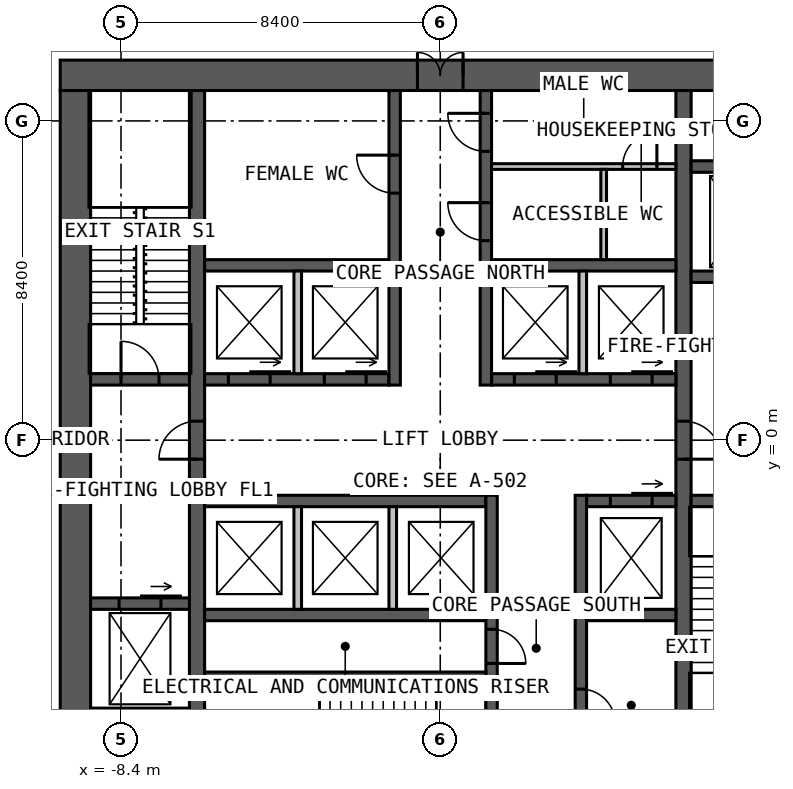
"""IFC4 building model, lengths in metres.
Left out: names, types, materials, properties, quantities, classifications, styles, units other than length and angle.
Written with IfcOpenShell. Run it as: python <this file> out.ifc"""

import sys

from ifc_helpers import new_model, si_unit, direction, frame, frame_2d, origin, place, context, subcontext, project, spatial, rectangle, extrude, element, fill, save


model = new_model("IFC4")
c1 = context("Model", 3, precision=1e-05, world=origin(), true_north=direction((0.0, 1.0)))
c2 = subcontext(c1, "Body", "Model", "MODEL_VIEW")
j1 = project(units=[si_unit("LENGTHUNIT", "METRE"), si_unit("PLANEANGLEUNIT", "RADIAN")], contexts=[c1])
p1 = place(None, origin())
s1 = spatial("IfcSite", under=j1, at=p1, CompositionType="ELEMENT")
p2 = place(p1, origin())
s2 = spatial("IfcBuilding", under=s1, at=p2, CompositionType="ELEMENT")
p3 = place(p2, frame((0.0, 0.0, 77.0)))
s3 = spatial("IfcBuildingStorey", under=s2, at=p3, CompositionType="ELEMENT", Elevation=77.0)
p4 = place(p3, frame((-10.0, 9.6, 0.0), z_axis=(0.0, 0.0, 1.0), x_axis=(1.0, 0.0, 0.0)))
e1 = element("IfcWall", 1, at=p4, inside=s3, PredefinedType="SOLIDWALL", context=c2, shape_type="SweptSolid", body=[
    extrude(rectangle(XDim=20.0, YDim=0.8, at=frame_2d((10.0, 0.0))), origin(), (0.0, 0.0, 1.0), 4.0),
])
p5 = place(p4, frame((9.4, 0.0, 0.0)))
e2 = element("IfcOpeningElement", 2, at=p5, cuts=e1, PredefinedType="OPENING", context=c2, shape_type="SweptSolid", body=[
    extrude(rectangle(XDim=1.2, YDim=2.2, at=frame_2d((0.6, 1.1))), frame((0.0, 0.41, 0.0), z_axis=(0.0, -1.0, 0.0), x_axis=(1.0, 0.0, 0.0)), (0.0, 0.0, 1.0), 0.82),
])
p6 = place(p3, frame((-9.6, 9.2, 0.0), z_axis=(0.0, 0.0, 1.0), x_axis=(0.0, -1.0, 0.0)))
e3 = element("IfcWall", 3, at=p6, inside=s3, PredefinedType="SOLIDWALL", context=c2, shape_type="SweptSolid", body=[
    extrude(rectangle(XDim=18.4, YDim=0.8, at=frame_2d((9.2, 0.0))), origin(), (0.0, 0.0, 1.0), 4.0),
])
p7 = place(p3, frame((-6.4, -9.2, 0.0), z_axis=(0.0, 0.0, 1.0), x_axis=(0.0, 1.0, 0.0)))
e4 = element("IfcWall", 4, at=p7, inside=s3, PredefinedType="SOLIDWALL", context=c2, shape_type="SweptSolid", body=[
    extrude(rectangle(XDim=18.4, YDim=0.4, at=frame_2d((9.2, 0.0))), origin(), (0.0, 0.0, 1.0), 4.0),
])
p8 = place(p7, frame((8.7, 0.0, 0.0)))
e5 = element("IfcOpeningElement", 5, at=p8, cuts=e4, PredefinedType="OPENING", context=c2, shape_type="SweptSolid", body=[
    extrude(rectangle(XDim=1.0, YDim=2.2, at=frame_2d((0.5, 1.1))), frame((0.0, 0.21, 0.0), z_axis=(0.0, -1.0, 0.0), x_axis=(1.0, 0.0, 0.0)), (0.0, 0.0, 1.0), 0.42),
])
p9 = place(p3, frame((6.4, 9.2, 0.0), z_axis=(0.0, 0.0, 1.0), x_axis=(0.0, -1.0, 0.0)))
e6 = element("IfcWall", 6, at=p9, inside=s3, PredefinedType="SOLIDWALL", context=c2, shape_type="SweptSolid", body=[
    extrude(rectangle(XDim=18.4, YDim=0.4, at=frame_2d((9.2, 0.0))), origin(), (0.0, 0.0, 1.0), 4.0),
])
p10 = place(p9, frame((8.7, 0.0, 0.0)))
e7 = element("IfcOpeningElement", 7, at=p10, cuts=e6, PredefinedType="OPENING", context=c2, shape_type="SweptSolid", body=[
    extrude(rectangle(XDim=1.0, YDim=2.2, at=frame_2d((0.5, 1.1))), frame((0.0, 0.21, 0.0), z_axis=(0.0, -1.0, 0.0), x_axis=(1.0, 0.0, 0.0)), (0.0, 0.0, 1.0), 0.42),
])
p11 = place(p3, frame((-6.2, 1.6, 0.0), z_axis=(0.0, 0.0, 1.0), x_axis=(1.0, 0.0, 0.0)))
e8 = element("IfcWall", 8, at=p11, inside=s3, PredefinedType="SOLIDWALL", context=c2, shape_type="SweptSolid", body=[
    extrude(rectangle(XDim=4.85, YDim=0.3, at=frame_2d((2.425, 0.0))), origin(), (0.0, 0.0, 1.0), 4.0),
])
p12 = place(p11, frame((0.625, 0.0, 0.0)))
e9 = element("IfcOpeningElement", 9, at=p12, cuts=e8, PredefinedType="OPENING", context=c2, shape_type="SweptSolid", body=[
    extrude(rectangle(XDim=1.1, YDim=2.2, at=frame_2d((0.55, 1.1))), frame((0.0, 0.16, 0.0), z_axis=(0.0, -1.0, 0.0), x_axis=(1.0, 0.0, 0.0)), (0.0, 0.0, 1.0), 0.32),
])
p13 = place(p11, frame((3.15, 0.0, 0.0)))
e10 = element("IfcOpeningElement", 10, at=p13, cuts=e8, PredefinedType="OPENING", context=c2, shape_type="SweptSolid", body=[
    extrude(rectangle(XDim=1.1, YDim=2.2, at=frame_2d((0.55, 1.1))), frame((0.0, 0.16, 0.0), z_axis=(0.0, -1.0, 0.0), x_axis=(1.0, 0.0, 0.0)), (0.0, 0.0, 1.0), 0.32),
])
p14 = place(p3, frame((1.35, 1.6, 0.0), z_axis=(0.0, 0.0, 1.0), x_axis=(1.0, 0.0, 0.0)))
e11 = element("IfcWall", 11, at=p14, inside=s3, PredefinedType="SOLIDWALL", context=c2, shape_type="SweptSolid", body=[
    extrude(rectangle(XDim=4.85, YDim=0.3, at=frame_2d((2.425, 0.0))), origin(), (0.0, 0.0, 1.0), 4.0),
])
p15 = place(p14, frame((0.6, 0.0, 0.0)))
e12 = element("IfcOpeningElement", 12, at=p15, cuts=e11, PredefinedType="OPENING", context=c2, shape_type="SweptSolid", body=[
    extrude(rectangle(XDim=1.1, YDim=2.2, at=frame_2d((0.55, 1.1))), frame((0.0, 0.16, 0.0), z_axis=(0.0, -1.0, 0.0), x_axis=(1.0, 0.0, 0.0)), (0.0, 0.0, 1.0), 0.32),
])
p16 = place(p14, frame((3.125, 0.0, 0.0)))
e13 = element("IfcOpeningElement", 13, at=p16, cuts=e11, PredefinedType="OPENING", context=c2, shape_type="SweptSolid", body=[
    extrude(rectangle(XDim=1.1, YDim=2.2, at=frame_2d((0.55, 1.1))), frame((0.0, 0.16, 0.0), z_axis=(0.0, -1.0, 0.0), x_axis=(1.0, 0.0, 0.0)), (0.0, 0.0, 1.0), 0.32),
])
for number, where, z_axis, x_axis in (
    (14, (-6.2, 4.6, 0.0), (0.0, 0.0, 1.0), (1.0, 0.0, 0.0)),
    (15, (1.35, 4.6, 0.0), (0.0, 0.0, 1.0), (1.0, 0.0, 0.0)),
):
    element("IfcWall", number, at=place(p3, frame(where, z_axis=z_axis, x_axis=x_axis)), inside=s3, PredefinedType="SOLIDWALL", context=c2, shape_type="SweptSolid", body=[
        extrude(rectangle(XDim=4.85, YDim=0.3, at=frame_2d((2.425, 0.0))), origin(), (0.0, 0.0, 1.0), 4.0),
    ])
p17 = place(p3, frame((-1.2, 1.45, 0.0), z_axis=(0.0, 0.0, 1.0), x_axis=(0.0, 1.0, 0.0)))
e16 = element("IfcWall", 16, at=p17, inside=s3, PredefinedType="SOLIDWALL", context=c2, shape_type="SweptSolid", body=[
    extrude(rectangle(XDim=7.75, YDim=0.3, at=frame_2d((3.875, 0.0))), origin(), (0.0, 0.0, 1.0), 4.0),
])
p18 = place(p17, frame((5.05, 0.0, 0.0)))
e17 = element("IfcOpeningElement", 17, at=p18, cuts=e16, PredefinedType="OPENING", context=c2, shape_type="SweptSolid", body=[
    extrude(rectangle(XDim=1.0, YDim=2.2, at=frame_2d((0.5, 1.1))), frame((0.0, 0.16, 0.0), z_axis=(0.0, -1.0, 0.0), x_axis=(1.0, 0.0, 0.0)), (0.0, 0.0, 1.0), 0.32),
])
p19 = place(p3, frame((1.2, 1.45, 0.0), z_axis=(0.0, 0.0, 1.0), x_axis=(0.0, 1.0, 0.0)))
e18 = element("IfcWall", 18, at=p19, inside=s3, PredefinedType="SOLIDWALL", context=c2, shape_type="SweptSolid", body=[
    extrude(rectangle(XDim=7.75, YDim=0.3, at=frame_2d((3.875, 0.0))), origin(), (0.0, 0.0, 1.0), 4.0),
])
p20 = place(p19, frame((3.8, 0.0, 0.0)))
e19 = element("IfcOpeningElement", 19, at=p20, cuts=e18, PredefinedType="OPENING", context=c2, shape_type="SweptSolid", body=[
    extrude(rectangle(XDim=1.0, YDim=2.2, at=frame_2d((0.5, 1.1))), frame((0.0, 0.16, 0.0), z_axis=(0.0, -1.0, 0.0), x_axis=(1.0, 0.0, 0.0)), (0.0, 0.0, 1.0), 0.32),
])
p21 = place(p19, frame((6.15, 0.0, 0.0)))
e20 = element("IfcOpeningElement", 20, at=p21, cuts=e18, PredefinedType="OPENING", context=c2, shape_type="SweptSolid", body=[
    extrude(rectangle(XDim=1.0, YDim=2.2, at=frame_2d((0.5, 1.1))), frame((0.0, 0.16, 0.0), z_axis=(0.0, -1.0, 0.0), x_axis=(1.0, 0.0, 0.0)), (0.0, 0.0, 1.0), 0.32),
])
p22 = place(p3, frame((-6.2, -1.6, 0.0), z_axis=(0.0, 0.0, 1.0), x_axis=(1.0, 0.0, 0.0)))
e21 = element("IfcWall", 21, at=p22, inside=s3, PredefinedType="SOLIDWALL", context=c2, shape_type="SweptSolid", body=[
    extrude(rectangle(XDim=7.4, YDim=0.3, at=frame_2d((3.7, 0.0))), origin(), (0.0, 0.0, 1.0), 4.0),
])
p23 = place(p3, frame((3.85, -1.6, 0.0), z_axis=(0.0, 0.0, 1.0), x_axis=(1.0, 0.0, 0.0)))
e22 = element("IfcWall", 22, at=p23, inside=s3, PredefinedType="SOLIDWALL", context=c2, shape_type="SweptSolid", body=[
    extrude(rectangle(XDim=2.35, YDim=0.3, at=frame_2d((1.175, 0.0))), origin(), (0.0, 0.0, 1.0), 4.0),
])
p24 = place(p23, frame((0.625, 0.0, 0.0)))
e23 = element("IfcOpeningElement", 23, at=p24, cuts=e22, PredefinedType="OPENING", context=c2, shape_type="SweptSolid", body=[
    extrude(rectangle(XDim=1.1, YDim=2.2, at=frame_2d((0.55, 1.1))), frame((0.0, 0.16, 0.0), z_axis=(0.0, -1.0, 0.0), x_axis=(1.0, 0.0, 0.0)), (0.0, 0.0, 1.0), 0.32),
])
p25 = place(p3, frame((-6.2, -4.6, 0.0), z_axis=(0.0, 0.0, 1.0), x_axis=(1.0, 0.0, 0.0)))
e24 = element("IfcWall", 24, at=p25, inside=s3, PredefinedType="SOLIDWALL", context=c2, shape_type="SweptSolid", body=[
    extrude(rectangle(XDim=7.4, YDim=0.3, at=frame_2d((3.7, 0.0))), origin(), (0.0, 0.0, 1.0), 4.0),
])
p26 = place(p3, frame((3.85, -4.6, 0.0), z_axis=(0.0, 0.0, 1.0), x_axis=(1.0, 0.0, 0.0)))
e25 = element("IfcWall", 25, at=p26, inside=s3, PredefinedType="SOLIDWALL", context=c2, shape_type="SweptSolid", body=[
    extrude(rectangle(XDim=2.35, YDim=0.3, at=frame_2d((1.175, 0.0))), origin(), (0.0, 0.0, 1.0), 4.0),
])
p27 = place(p3, frame((1.35, -1.45, 0.0), z_axis=(0.0, 0.0, 1.0), x_axis=(0.0, -1.0, 0.0)))
e26 = element("IfcWall", 26, at=p27, inside=s3, PredefinedType="SOLIDWALL", context=c2, shape_type="SweptSolid", body=[
    extrude(rectangle(XDim=7.75, YDim=0.3, at=frame_2d((3.875, 0.0))), origin(), (0.0, 0.0, 1.0), 4.0),
])
p28 = place(p27, frame((5.8, 0.0, 0.0)))
e27 = element("IfcOpeningElement", 27, at=p28, cuts=e26, PredefinedType="OPENING", context=c2, shape_type="SweptSolid", body=[
    extrude(rectangle(XDim=1.0, YDim=2.2, at=frame_2d((0.5, 1.1))), frame((0.0, 0.16, 0.0), z_axis=(0.0, -1.0, 0.0), x_axis=(1.0, 0.0, 0.0)), (0.0, 0.0, 1.0), 0.32),
])
p29 = place(p27, frame((3.525, 0.0, 0.0)))
e28 = element("IfcOpeningElement", 28, at=p29, cuts=e26, PredefinedType="OPENING", context=c2, shape_type="SweptSolid", body=[
    extrude(rectangle(XDim=0.9, YDim=2.2, at=frame_2d((0.45, 1.1))), frame((0.0, 0.16, 0.0), z_axis=(0.0, -1.0, 0.0), x_axis=(1.0, 0.0, 0.0)), (0.0, 0.0, 1.0), 0.32),
])
p30 = place(p3, frame((3.7, -1.45, 0.0), z_axis=(0.0, 0.0, 1.0), x_axis=(0.0, -1.0, 0.0)))
e29 = element("IfcWall", 29, at=p30, inside=s3, PredefinedType="SOLIDWALL", context=c2, shape_type="SweptSolid", body=[
    extrude(rectangle(XDim=7.75, YDim=0.3, at=frame_2d((3.875, 0.0))), origin(), (0.0, 0.0, 1.0), 4.0),
])
p31 = place(p30, frame((5.1, 0.0, 0.0)))
e30 = element("IfcOpeningElement", 30, at=p31, cuts=e29, PredefinedType="OPENING", context=c2, shape_type="SweptSolid", body=[
    extrude(rectangle(XDim=0.9, YDim=2.2, at=frame_2d((0.45, 1.1))), frame((0.0, 0.16, 0.0), z_axis=(0.0, -1.0, 0.0), x_axis=(1.0, 0.0, 0.0)), (0.0, 0.0, 1.0), 0.32),
])
p32 = place(p3, frame((-6.2, -6.2, 0.0), z_axis=(0.0, 0.0, 1.0), x_axis=(1.0, 0.0, 0.0)))
e31 = element("IfcWall", 31, at=p32, inside=s3, PredefinedType="SOLIDWALL", context=c2, shape_type="SweptSolid", body=[
    extrude(rectangle(XDim=7.4, YDim=0.2, at=frame_2d((3.7, 0.0))), origin(), (0.0, 0.0, 1.0), 4.0),
])
p33 = place(p3, frame((-9.2, 1.6, 0.0), z_axis=(0.0, 0.0, 1.0), x_axis=(1.0, 0.0, 0.0)))
e32 = element("IfcWall", 32, at=p33, inside=s3, PredefinedType="SOLIDWALL", context=c2, shape_type="SweptSolid", body=[
    extrude(rectangle(XDim=2.6, YDim=0.3, at=frame_2d((1.3, 0.0))), origin(), (0.0, 0.0, 1.0), 4.0),
])
p34 = place(p33, frame((0.8, 0.0, 0.0)))
e33 = element("IfcOpeningElement", 33, at=p34, cuts=e32, PredefinedType="OPENING", context=c2, shape_type="SweptSolid", body=[
    extrude(rectangle(XDim=1.0, YDim=2.2, at=frame_2d((0.5, 1.1))), frame((0.0, 0.16, 0.0), z_axis=(0.0, -1.0, 0.0), x_axis=(1.0, 0.0, 0.0)), (0.0, 0.0, 1.0), 0.32),
])
p35 = place(p3, frame((6.6, -1.6, 0.0), z_axis=(0.0, 0.0, 1.0), x_axis=(1.0, 0.0, 0.0)))
e34 = element("IfcWall", 34, at=p35, inside=s3, PredefinedType="SOLIDWALL", context=c2, shape_type="SweptSolid", body=[
    extrude(rectangle(XDim=2.6, YDim=0.3, at=frame_2d((1.3, 0.0))), origin(), (0.0, 0.0, 1.0), 4.0),
])
p36 = place(p35, frame((0.8, 0.0, 0.0)))
e35 = element("IfcOpeningElement", 35, at=p36, cuts=e34, PredefinedType="OPENING", context=c2, shape_type="SweptSolid", body=[
    extrude(rectangle(XDim=1.0, YDim=2.2, at=frame_2d((0.5, 1.1))), frame((0.0, 0.16, 0.0), z_axis=(0.0, -1.0, 0.0), x_axis=(1.0, 0.0, 0.0)), (0.0, 0.0, 1.0), 0.32),
])
p37 = place(p3, frame((-9.2, -4.3, 0.0), z_axis=(0.0, 0.0, 1.0), x_axis=(1.0, 0.0, 0.0)))
e36 = element("IfcWall", 36, at=p37, inside=s3, PredefinedType="SOLIDWALL", context=c2, shape_type="SweptSolid", body=[
    extrude(rectangle(XDim=2.6, YDim=0.3, at=frame_2d((1.3, 0.0))), origin(), (0.0, 0.0, 1.0), 4.0),
])
p38 = place(p37, frame((0.75, 0.0, 0.0)))
e37 = element("IfcOpeningElement", 37, at=p38, cuts=e36, PredefinedType="OPENING", context=c2, shape_type="SweptSolid", body=[
    extrude(rectangle(XDim=1.1, YDim=2.2, at=frame_2d((0.55, 1.1))), frame((0.0, 0.16, 0.0), z_axis=(0.0, -1.0, 0.0), x_axis=(1.0, 0.0, 0.0)), (0.0, 0.0, 1.0), 0.32),
])
p39 = place(p3, frame((6.6, 4.3, 0.0), z_axis=(0.0, 0.0, 1.0), x_axis=(1.0, 0.0, 0.0)))
e38 = element("IfcWall", 38, at=p39, inside=s3, PredefinedType="SOLIDWALL", context=c2, shape_type="SweptSolid", body=[
    extrude(rectangle(XDim=2.6, YDim=0.3, at=frame_2d((1.3, 0.0))), origin(), (0.0, 0.0, 1.0), 4.0),
])
p40 = place(p39, frame((0.75, 0.0, 0.0)))
e39 = element("IfcOpeningElement", 39, at=p40, cuts=e38, PredefinedType="OPENING", context=c2, shape_type="SweptSolid", body=[
    extrude(rectangle(XDim=1.1, YDim=2.2, at=frame_2d((0.55, 1.1))), frame((0.0, 0.16, 0.0), z_axis=(0.0, -1.0, 0.0), x_axis=(1.0, 0.0, 0.0)), (0.0, 0.0, 1.0), 0.32),
])
for number, where, z_axis, x_axis in (
    (40, (-9.2, -7.2, 0.0), (0.0, 0.0, 1.0), (1.0, 0.0, 0.0)),
    (41, (6.6, 7.2, 0.0), (0.0, 0.0, 1.0), (1.0, 0.0, 0.0)),
):
    element("IfcWall", number, at=place(p3, frame(where, z_axis=z_axis, x_axis=x_axis)), inside=s3, PredefinedType="SOLIDWALL", context=c2, shape_type="SweptSolid", body=[
        extrude(rectangle(XDim=2.6, YDim=0.3, at=frame_2d((1.3, 0.0))), origin(), (0.0, 0.0, 1.0), 4.0),
    ])
for number, where, z_axis, x_axis in (
    (42, (-3.75, 1.75, 0.0), (0.0, 0.0, 1.0), (0.0, 1.0, 0.0)),
    (43, (3.75, 1.75, 0.0), (0.0, 0.0, 1.0), (0.0, 1.0, 0.0)),
    (44, (-3.75, -1.75, 0.0), (0.0, 0.0, 1.0), (0.0, -1.0, 0.0)),
    (45, (-1.25, -1.75, 0.0), (0.0, 0.0, 1.0), (0.0, -1.0, 0.0)),
):
    element("IfcWall", number, at=place(p3, frame(where, z_axis=z_axis, x_axis=x_axis)), inside=s3, PredefinedType="SOLIDWALL", context=c2, shape_type="SweptSolid", body=[
        extrude(rectangle(XDim=2.7, YDim=0.2, at=frame_2d((1.35, 0.0))), origin(), (0.0, 0.0, 1.0), 3.75),
    ])
p41 = place(p3, frame((1.35, 7.2, 0.0), z_axis=(0.0, 0.0, 1.0), x_axis=(1.0, 0.0, 0.0)))
e46 = element("IfcWall", 46, at=p41, inside=s3, PredefinedType="PARTITIONING", context=c2, shape_type="SweptSolid", body=[
    extrude(rectangle(XDim=4.85, YDim=0.15, at=frame_2d((2.425, 0.0))), origin(), (0.0, 0.0, 1.0), 3.75),
])
p42 = place(p41, frame((3.45, 0.0, 0.0)))
e47 = element("IfcOpeningElement", 47, at=p42, cuts=e46, PredefinedType="OPENING", context=c2, shape_type="SweptSolid", body=[
    extrude(rectangle(XDim=0.9, YDim=2.2, at=frame_2d((0.45, 1.1))), frame((0.0, 0.085, 0.0), z_axis=(0.0, -1.0, 0.0), x_axis=(1.0, 0.0, 0.0)), (0.0, 0.0, 1.0), 0.17),
])
p43 = place(p3, frame((4.3, 4.75, 0.0), z_axis=(0.0, 0.0, 1.0), x_axis=(0.0, 1.0, 0.0)))
e48 = element("IfcWall", 48, at=p43, inside=s3, PredefinedType="PARTITIONING", context=c2, shape_type="SweptSolid", body=[
    extrude(rectangle(XDim=2.375, YDim=0.15, at=frame_2d((1.188, 0.0))), origin(), (0.0, 0.0, 1.0), 3.75),
])
p44 = place(p5, origin())
e49 = element("IfcDoor", 49, at=p44, inside=s3, OperationType="DOUBLE_DOOR_SINGLE_SWING", PredefinedType="DOOR", context=c2, shape_type="SweptSolid", body=[
    extrude(rectangle(XDim=1.2, YDim=2.2, at=frame_2d((0.6, 1.1))), frame((0.0, 0.025, 0.0), z_axis=(0.0, -1.0, 0.0), x_axis=(1.0, 0.0, 0.0)), (0.0, 0.0, 1.0), 0.05),
])
fill(e2, e49)
p45 = place(p8, origin())
e50 = element("IfcDoor", 50, at=p45, inside=s3, OperationType="SINGLE_SWING_LEFT", PredefinedType="DOOR", context=c2, shape_type="SweptSolid", body=[
    extrude(rectangle(XDim=1.0, YDim=2.2, at=frame_2d((0.5, 1.1))), frame((0.0, 0.025, 0.0), z_axis=(0.0, -1.0, 0.0), x_axis=(1.0, 0.0, 0.0)), (0.0, 0.0, 1.0), 0.05),
])
fill(e5, e50)
p46 = place(p10, origin())
e51 = element("IfcDoor", 51, at=p46, inside=s3, OperationType="SINGLE_SWING_RIGHT", PredefinedType="DOOR", context=c2, shape_type="SweptSolid", body=[
    extrude(rectangle(XDim=1.0, YDim=2.2, at=frame_2d((0.5, 1.1))), frame((0.0, 0.025, 0.0), z_axis=(0.0, -1.0, 0.0), x_axis=(1.0, 0.0, 0.0)), (0.0, 0.0, 1.0), 0.05),
])
fill(e7, e51)
p47 = place(p34, origin())
e52 = element("IfcDoor", 52, at=p47, inside=s3, OperationType="SINGLE_SWING_LEFT", PredefinedType="DOOR", context=c2, shape_type="SweptSolid", body=[
    extrude(rectangle(XDim=1.0, YDim=2.2, at=frame_2d((0.5, 1.1))), frame((0.0, 0.025, 0.0), z_axis=(0.0, -1.0, 0.0), x_axis=(1.0, 0.0, 0.0)), (0.0, 0.0, 1.0), 0.05),
])
fill(e33, e52)
p48 = place(p18, origin())
e53 = element("IfcDoor", 53, at=p48, inside=s3, OperationType="SINGLE_SWING_RIGHT", PredefinedType="DOOR", context=c2, shape_type="SweptSolid", body=[
    extrude(rectangle(XDim=1.0, YDim=2.2, at=frame_2d((0.5, 1.1))), frame((0.0, 0.025, 0.0), z_axis=(0.0, -1.0, 0.0), x_axis=(1.0, 0.0, 0.0)), (0.0, 0.0, 1.0), 0.05),
])
fill(e17, e53)
p49 = place(p20, origin())
e54 = element("IfcDoor", 54, at=p49, inside=s3, OperationType="SINGLE_SWING_RIGHT", PredefinedType="DOOR", context=c2, shape_type="SweptSolid", body=[
    extrude(rectangle(XDim=1.0, YDim=2.2, at=frame_2d((0.5, 1.1))), frame((0.0, 0.025, 0.0), z_axis=(0.0, -1.0, 0.0), x_axis=(1.0, 0.0, 0.0)), (0.0, 0.0, 1.0), 0.05),
])
fill(e19, e54)
p50 = place(p21, origin())
e55 = element("IfcDoor", 55, at=p50, inside=s3, OperationType="SINGLE_SWING_RIGHT", PredefinedType="DOOR", context=c2, shape_type="SweptSolid", body=[
    extrude(rectangle(XDim=1.0, YDim=2.2, at=frame_2d((0.5, 1.1))), frame((0.0, 0.025, 0.0), z_axis=(0.0, -1.0, 0.0), x_axis=(1.0, 0.0, 0.0)), (0.0, 0.0, 1.0), 0.05),
])
fill(e20, e55)
p51 = place(p29, origin())
e56 = element("IfcDoor", 56, at=p51, inside=s3, OperationType="SINGLE_SWING_RIGHT", PredefinedType="DOOR", context=c2, shape_type="SweptSolid", body=[
    extrude(rectangle(XDim=0.9, YDim=2.2, at=frame_2d((0.45, 1.1))), frame((0.0, 0.025, 0.0), z_axis=(0.0, -1.0, 0.0), x_axis=(1.0, 0.0, 0.0)), (0.0, 0.0, 1.0), 0.05),
])
fill(e28, e56)
p52 = place(p31, origin())
e57 = element("IfcDoor", 57, at=p52, inside=s3, OperationType="SINGLE_SWING_RIGHT", PredefinedType="DOOR", context=c2, shape_type="SweptSolid", body=[
    extrude(rectangle(XDim=0.9, YDim=2.2, at=frame_2d((0.45, 1.1))), frame((0.0, 0.025, 0.0), z_axis=(0.0, -1.0, 0.0), x_axis=(1.0, 0.0, 0.0)), (0.0, 0.0, 1.0), 0.05),
])
fill(e30, e57)
p53 = place(p42, origin())
e58 = element("IfcDoor", 58, at=p53, inside=s3, OperationType="SINGLE_SWING_RIGHT", PredefinedType="DOOR", context=c2, shape_type="SweptSolid", body=[
    extrude(rectangle(XDim=0.9, YDim=2.2, at=frame_2d((0.45, 1.1))), frame((0.0, 0.025, 0.0), z_axis=(0.0, -1.0, 0.0), x_axis=(1.0, 0.0, 0.0)), (0.0, 0.0, 1.0), 0.05),
])
fill(e47, e58)
p54 = place(p12, origin())
e59 = element("IfcDoor", 59, at=p54, inside=s3, OperationType="SLIDING_TO_LEFT", PredefinedType="DOOR", context=c2, shape_type="SweptSolid", body=[
    extrude(rectangle(XDim=1.1, YDim=2.2, at=frame_2d((0.55, 1.1))), frame((0.0, 0.025, 0.0), z_axis=(0.0, -1.0, 0.0), x_axis=(1.0, 0.0, 0.0)), (0.0, 0.0, 1.0), 0.05),
])
fill(e9, e59)
p55 = place(p13, origin())
e60 = element("IfcDoor", 60, at=p55, inside=s3, OperationType="SLIDING_TO_LEFT", PredefinedType="DOOR", context=c2, shape_type="SweptSolid", body=[
    extrude(rectangle(XDim=1.1, YDim=2.2, at=frame_2d((0.55, 1.1))), frame((0.0, 0.025, 0.0), z_axis=(0.0, -1.0, 0.0), x_axis=(1.0, 0.0, 0.0)), (0.0, 0.0, 1.0), 0.05),
])
fill(e10, e60)
p56 = place(p15, origin())
e61 = element("IfcDoor", 61, at=p56, inside=s3, OperationType="SLIDING_TO_LEFT", PredefinedType="DOOR", context=c2, shape_type="SweptSolid", body=[
    extrude(rectangle(XDim=1.1, YDim=2.2, at=frame_2d((0.55, 1.1))), frame((0.0, 0.025, 0.0), z_axis=(0.0, -1.0, 0.0), x_axis=(1.0, 0.0, 0.0)), (0.0, 0.0, 1.0), 0.05),
])
fill(e12, e61)
p57 = place(p16, origin())
e62 = element("IfcDoor", 62, at=p57, inside=s3, OperationType="SLIDING_TO_LEFT", PredefinedType="DOOR", context=c2, shape_type="SweptSolid", body=[
    extrude(rectangle(XDim=1.1, YDim=2.2, at=frame_2d((0.55, 1.1))), frame((0.0, 0.025, 0.0), z_axis=(0.0, -1.0, 0.0), x_axis=(1.0, 0.0, 0.0)), (0.0, 0.0, 1.0), 0.05),
])
fill(e13, e62)
p58 = place(p24, origin())
e63 = element("IfcDoor", 63, at=p58, inside=s3, OperationType="SLIDING_TO_LEFT", PredefinedType="DOOR", context=c2, shape_type="SweptSolid", body=[
    extrude(rectangle(XDim=1.1, YDim=2.2, at=frame_2d((0.55, 1.1))), frame((0.0, 0.025, 0.0), z_axis=(0.0, -1.0, 0.0), x_axis=(1.0, 0.0, 0.0)), (0.0, 0.0, 1.0), 0.05),
])
fill(e23, e63)
p59 = place(p38, origin())
e64 = element("IfcDoor", 64, at=p59, inside=s3, OperationType="SLIDING_TO_LEFT", PredefinedType="DOOR", context=c2, shape_type="SweptSolid", body=[
    extrude(rectangle(XDim=1.1, YDim=2.2, at=frame_2d((0.55, 1.1))), frame((0.0, 0.025, 0.0), z_axis=(0.0, -1.0, 0.0), x_axis=(1.0, 0.0, 0.0)), (0.0, 0.0, 1.0), 0.05),
])
fill(e37, e64)
save(model, sys.argv[1])
